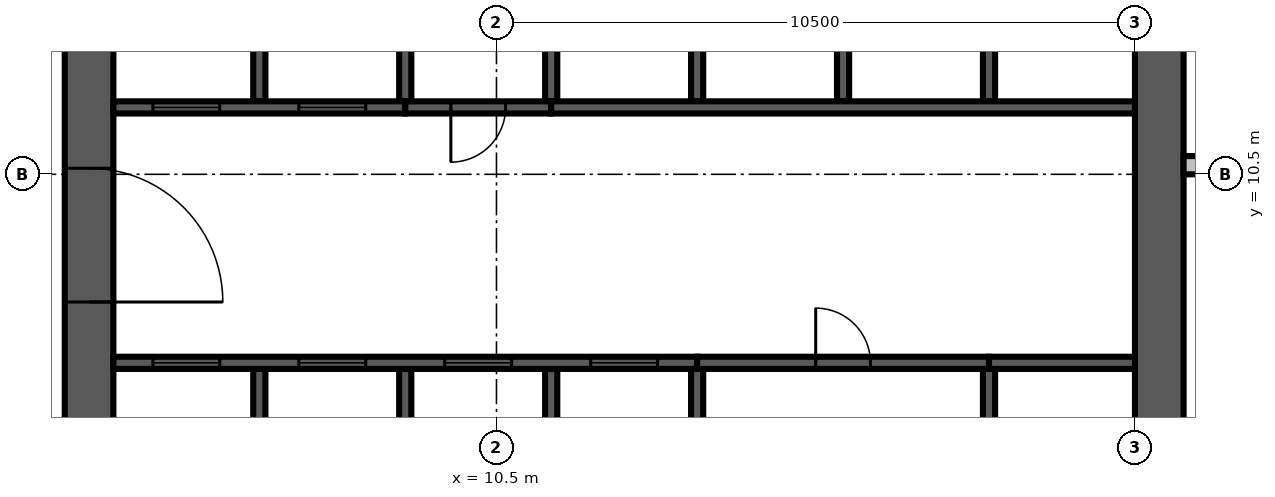
"""IFC4 building model, lengths in metres.
Left out: names, types, materials, properties, quantities, classifications, styles, units other than length and angle.
Written with IfcOpenShell. Run it as: python <this file> out.ifc"""

import sys

from ifc_helpers import new_model, si_unit, direction, frame, frame_2d, origin, place, context, subcontext, project, spatial, rectangle, extrude, source, transform, mapped, element, fill, save


model = new_model("IFC4")
c1 = context("Model", 3, precision=1e-05, world=origin(), true_north=direction((0.0, 1.0)))
c2 = subcontext(c1, "Body", "Model", "MODEL_VIEW")
j1 = project(units=[si_unit("LENGTHUNIT", "METRE"), si_unit("PLANEANGLEUNIT", "RADIAN")], contexts=[c1])
p1 = place(None, origin())
s1 = spatial("IfcSite", under=j1, at=p1, CompositionType="ELEMENT")
p2 = place(p1, origin())
s2 = spatial("IfcBuilding", under=s1, at=p2, CompositionType="ELEMENT")
p3 = place(p2, frame((0.0, 0.0, 257.6)))
s3 = spatial("IfcBuildingStorey", under=s2, at=p3, CompositionType="ELEMENT", Elevation=257.6)
m1 = source(origin(), c2, "Body", "SweptSolid", [
    extrude(rectangle(XDim=17.6, YDim=0.8, at=frame_2d((8.8, 0.0))), origin(), (0.0, 0.0, 1.0), 3.8),
])
p4 = place(p3, frame((3.8, 4.2, 0.0), z_axis=(0.0, 0.0, 1.0), x_axis=(0.0, 1.0, 0.0)))
e1 = element("IfcWall", 1, at=p4, inside=s3, PredefinedType="SHEAR", context=c2, shape_type="MappedRepresentation", body=[
    mapped(m1, transform((0.0, 0.0, 0.0), scale=1.0)),
])
m2 = source(origin(), c2, "Body", "SweptSolid", [
    extrude(rectangle(XDim=2.2, YDim=2.1, at=frame_2d((1.1, 1.05))), frame((0.0, 0.41, 0.0), z_axis=(0.0, -1.0, 0.0), x_axis=(1.0, 0.0, 0.0)), (0.0, 0.0, 1.0), 0.82),
])
p5 = place(p4, frame((4.2, 0.0, 0.0)))
e2 = element("IfcOpeningElement", 2, at=p5, cuts=e1, PredefinedType="OPENING", context=c2, shape_type="MappedRepresentation", body=[
    mapped(m2, transform((0.0, 0.0, 0.0), scale=1.0)),
])
m3 = source(origin(), c2, "Body", "SweptSolid", [
    extrude(rectangle(XDim=0.9, YDim=2.1, at=frame_2d((0.45, 1.05))), frame((0.0, 0.41, 0.0), z_axis=(0.0, -1.0, 0.0), x_axis=(1.0, 0.0, 0.0)), (0.0, 0.0, 1.0), 0.82),
])
p6 = place(p4, frame((10.95, 0.0, 0.0)))
e3 = element("IfcOpeningElement", 3, at=p6, cuts=e1, PredefinedType="OPENING", context=c2, shape_type="MappedRepresentation", body=[
    mapped(m3, transform((0.0, 0.0, 0.0), scale=1.0)),
])
m4 = source(origin(), c2, "Body", "SweptSolid", [
    extrude(rectangle(XDim=16.8, YDim=0.8, at=frame_2d((8.4, 0.0))), origin(), (0.0, 0.0, 1.0), 3.8),
])
p7 = place(p3, frame((21.4, 4.2, 0.0), z_axis=(0.0, 0.0, 1.0), x_axis=(0.0, 1.0, 0.0)))
e4 = element("IfcWall", 4, at=p7, inside=s3, PredefinedType="SHEAR", context=c2, shape_type="MappedRepresentation", body=[
    mapped(m4, transform((0.0, 0.0, 0.0), scale=1.0)),
])
m5 = source(origin(), c2, "Body", "SweptSolid", [
    extrude(rectangle(XDim=1.2, YDim=2.1, at=frame_2d((0.6, 1.05))), frame((0.0, 0.41, 0.0), z_axis=(0.0, -1.0, 0.0), x_axis=(1.0, 0.0, 0.0)), (0.0, 0.0, 1.0), 0.82),
])
p8 = place(p7, frame((14.7, 0.0, 0.0)))
e5 = element("IfcOpeningElement", 5, at=p8, cuts=e4, PredefinedType="OPENING", context=c2, shape_type="MappedRepresentation", body=[
    mapped(m5, transform((0.0, 0.0, 0.0), scale=1.0)),
])
m6 = source(origin(), c2, "Body", "SweptSolid", [
    extrude(rectangle(XDim=7.2, YDim=0.3, at=frame_2d((3.6, 0.0))), origin(), (0.0, 0.0, 1.0), 3.4),
])
p9 = place(p3, frame((21.8, 10.65, 0.0), z_axis=(0.0, 0.0, 1.0), x_axis=(1.0, 0.0, 0.0)))
e6 = element("IfcWall", 6, at=p9, inside=s3, PredefinedType="STANDARD", context=c2, shape_type="MappedRepresentation", body=[
    mapped(m6, transform((0.0, 0.0, 0.0), scale=1.0)),
])
m7 = source(origin(), c2, "Body", "SweptSolid", [
    extrude(rectangle(XDim=1.8, YDim=2.3, at=frame_2d((0.9, 1.15))), frame((0.0, 0.16, 0.0), z_axis=(0.0, -1.0, 0.0), x_axis=(1.0, 0.0, 0.0)), (0.0, 0.0, 1.0), 0.32),
])
p10 = place(p9, frame((0.4, 0.0, 0.6)))
e7 = element("IfcOpeningElement", 7, at=p10, cuts=e6, PredefinedType="OPENING", context=c2, shape_type="MappedRepresentation", body=[
    mapped(m7, transform((0.0, 0.0, 0.0), scale=1.0)),
])
p11 = place(p9, frame((4.787, 0.0, 0.6)))
e8 = element("IfcOpeningElement", 8, at=p11, cuts=e6, PredefinedType="OPENING", context=c2, shape_type="MappedRepresentation", body=[
    mapped(m7, transform((0.0, 0.0, 0.0), scale=1.0)),
])
m8 = source(origin(), c2, "Body", "SweptSolid", [
    extrude(rectangle(XDim=3.1, YDim=0.2, at=frame_2d((1.55, 0.0))), origin(), (0.0, 0.0, 1.0), 3.8),
])
for number, where, z_axis, x_axis in (
    (9, (6.6, 4.2, 0.0), (0.0, 0.0, 1.0), (0.0, 1.0, 0.0)),
    (10, (9.0, 4.2, 0.0), (0.0, 0.0, 1.0), (0.0, 1.0, 0.0)),
    (11, (11.4, 4.2, 0.0), (0.0, 0.0, 1.0), (0.0, 1.0, 0.0)),
):
    element("IfcWall", number, at=place(p3, frame(where, z_axis=z_axis, x_axis=x_axis)), inside=s3, PredefinedType="SOLIDWALL", context=c2, shape_type="MappedRepresentation", body=[
        mapped(m8, transform((0.0, 0.0, 0.0), scale=1.0)),
    ])
m9 = source(origin(), c2, "Body", "SweptSolid", [
    extrude(rectangle(XDim=3.1, YDim=0.2, at=frame_2d((1.55, 0.0))), origin(), (0.0, 0.0, 1.0), 3.4),
])
for number, where, z_axis, x_axis in (
    (12, (13.8, 4.2, 0.0), (0.0, 0.0, 1.0), (0.0, 1.0, 0.0)),
    (13, (18.6, 4.2, 0.0), (0.0, 0.0, 1.0), (0.0, 1.0, 0.0)),
):
    element("IfcWall", number, at=place(p3, frame(where, z_axis=z_axis, x_axis=x_axis)), inside=s3, PredefinedType="SOLIDWALL", context=c2, shape_type="MappedRepresentation", body=[
        mapped(m9, transform((0.0, 0.0, 0.0), scale=1.0)),
    ])
m10 = source(origin(), c2, "Body", "SweptSolid", [
    extrude(rectangle(XDim=3.0, YDim=0.2, at=frame_2d((1.5, 0.0))), origin(), (0.0, 0.0, 1.0), 3.8),
])
p12 = place(p3, frame((6.6, 11.7, 0.0), z_axis=(0.0, 0.0, 1.0), x_axis=(0.0, 1.0, 0.0)))
e14 = element("IfcWall", 14, at=p12, inside=s3, PredefinedType="SOLIDWALL", context=c2, shape_type="MappedRepresentation", body=[
    mapped(m10, transform((0.0, 0.0, 0.0), scale=1.0)),
])
m11 = source(origin(), c2, "Body", "SweptSolid", [
    extrude(rectangle(XDim=3.0, YDim=0.2, at=frame_2d((1.5, 0.0))), origin(), (0.0, 0.0, 1.0), 3.4),
])
for number, where, z_axis, x_axis in (
    (15, (9.0, 11.7, 0.0), (0.0, 0.0, 1.0), (0.0, 1.0, 0.0)),
    (16, (11.4, 11.7, 0.0), (0.0, 0.0, 1.0), (0.0, 1.0, 0.0)),
):
    element("IfcWall", number, at=place(p3, frame(where, z_axis=z_axis, x_axis=x_axis)), inside=s3, PredefinedType="SOLIDWALL", context=c2, shape_type="MappedRepresentation", body=[
        mapped(m11, transform((0.0, 0.0, 0.0), scale=1.0)),
    ])
for number, where, z_axis, x_axis in (
    (17, (13.8, 11.7, 0.0), (0.0, 0.0, 1.0), (0.0, 1.0, 0.0)),
    (18, (16.2, 11.7, 0.0), (0.0, 0.0, 1.0), (0.0, 1.0, 0.0)),
    (19, (18.6, 11.7, 0.0), (0.0, 0.0, 1.0), (0.0, 1.0, 0.0)),
):
    element("IfcWall", number, at=place(p3, frame(where, z_axis=z_axis, x_axis=x_axis)), inside=s3, PredefinedType="SOLIDWALL", context=c2, shape_type="MappedRepresentation", body=[
        mapped(m10, transform((0.0, 0.0, 0.0), scale=1.0)),
    ])
m12 = source(origin(), c2, "Body", "SweptSolid", [
    extrude(rectangle(XDim=9.6, YDim=0.2, at=frame_2d((4.8, 0.0))), origin(), (0.0, 0.0, 1.0), 3.8),
])
p13 = place(p3, frame((4.2, 7.4, 0.0), z_axis=(0.0, 0.0, 1.0), x_axis=(1.0, 0.0, 0.0)))
e20 = element("IfcWall", 20, at=p13, inside=s3, PredefinedType="SOLIDWALL", context=c2, shape_type="MappedRepresentation", body=[
    mapped(m12, transform((0.0, 0.0, 0.0), scale=1.0)),
])
m13 = source(origin(), c2, "Body", "SweptSolid", [
    extrude(rectangle(XDim=1.1, YDim=2.1, at=frame_2d((0.55, 1.05))), frame((0.0, 0.11, 0.0), z_axis=(0.0, -1.0, 0.0), x_axis=(1.0, 0.0, 0.0)), (0.0, 0.0, 1.0), 0.22),
])
p14 = place(p13, frame((0.65, 0.0, 0.0)))
e21 = element("IfcOpeningElement", 21, at=p14, cuts=e20, PredefinedType="OPENING", context=c2, shape_type="MappedRepresentation", body=[
    mapped(m13, transform((0.0, 0.0, 0.0), scale=1.0)),
])
p15 = place(p13, frame((3.05, 0.0, 0.0)))
e22 = element("IfcOpeningElement", 22, at=p15, cuts=e20, PredefinedType="OPENING", context=c2, shape_type="MappedRepresentation", body=[
    mapped(m13, transform((0.0, 0.0, 0.0), scale=1.0)),
])
p16 = place(p13, frame((5.45, 0.0, 0.0)))
e23 = element("IfcOpeningElement", 23, at=p16, cuts=e20, PredefinedType="OPENING", context=c2, shape_type="MappedRepresentation", body=[
    mapped(m13, transform((0.0, 0.0, 0.0), scale=1.0)),
])
p17 = place(p13, frame((7.85, 0.0, 0.0)))
e24 = element("IfcOpeningElement", 24, at=p17, cuts=e20, PredefinedType="OPENING", context=c2, shape_type="MappedRepresentation", body=[
    mapped(m13, transform((0.0, 0.0, 0.0), scale=1.0)),
])
m14 = source(origin(), c2, "Body", "SweptSolid", [
    extrude(rectangle(XDim=4.8, YDim=0.2, at=frame_2d((2.4, 0.0))), origin(), (0.0, 0.0, 1.0), 3.4),
])
p18 = place(p3, frame((13.8, 7.4, 0.0), z_axis=(0.0, 0.0, 1.0), x_axis=(1.0, 0.0, 0.0)))
e25 = element("IfcWall", 25, at=p18, inside=s3, PredefinedType="SOLIDWALL", context=c2, shape_type="MappedRepresentation", body=[
    mapped(m14, transform((0.0, 0.0, 0.0), scale=1.0)),
])
m15 = source(origin(), c2, "Body", "SweptSolid", [
    extrude(rectangle(XDim=0.9, YDim=2.1, at=frame_2d((0.45, 1.05))), frame((0.0, 0.11, 0.0), z_axis=(0.0, -1.0, 0.0), x_axis=(1.0, 0.0, 0.0)), (0.0, 0.0, 1.0), 0.22),
])
p19 = place(p18, frame((1.95, 0.0, 0.0)))
e26 = element("IfcOpeningElement", 26, at=p19, cuts=e25, PredefinedType="OPENING", context=c2, shape_type="MappedRepresentation", body=[
    mapped(m15, transform((0.0, 0.0, 0.0), scale=1.0)),
])
m16 = source(origin(), c2, "Body", "SweptSolid", [
    extrude(rectangle(XDim=2.4, YDim=0.2, at=frame_2d((1.2, 0.0))), origin(), (0.0, 0.0, 1.0), 3.8),
])
p20 = place(p3, frame((18.6, 7.4, 0.0), z_axis=(0.0, 0.0, 1.0), x_axis=(1.0, 0.0, 0.0)))
e27 = element("IfcWall", 27, at=p20, inside=s3, PredefinedType="SOLIDWALL", context=c2, shape_type="MappedRepresentation", body=[
    mapped(m16, transform((0.0, 0.0, 0.0), scale=1.0)),
])
m17 = source(origin(), c2, "Body", "SweptSolid", [
    extrude(rectangle(XDim=4.8, YDim=0.2, at=frame_2d((2.4, 0.0))), origin(), (0.0, 0.0, 1.0), 3.8),
])
p21 = place(p3, frame((4.2, 11.6, 0.0), z_axis=(0.0, 0.0, 1.0), x_axis=(1.0, 0.0, 0.0)))
e28 = element("IfcWall", 28, at=p21, inside=s3, PredefinedType="SOLIDWALL", context=c2, shape_type="MappedRepresentation", body=[
    mapped(m17, transform((0.0, 0.0, 0.0), scale=1.0)),
])
p22 = place(p21, frame((0.65, 0.0, 0.0)))
e29 = element("IfcOpeningElement", 29, at=p22, cuts=e28, PredefinedType="OPENING", context=c2, shape_type="MappedRepresentation", body=[
    mapped(m13, transform((0.0, 0.0, 0.0), scale=1.0)),
])
p23 = place(p21, frame((3.05, 0.0, 0.0)))
e30 = element("IfcOpeningElement", 30, at=p23, cuts=e28, PredefinedType="OPENING", context=c2, shape_type="MappedRepresentation", body=[
    mapped(m13, transform((0.0, 0.0, 0.0), scale=1.0)),
])
m18 = source(origin(), c2, "Body", "SweptSolid", [
    extrude(rectangle(XDim=2.4, YDim=0.2, at=frame_2d((1.2, 0.0))), origin(), (0.0, 0.0, 1.0), 3.4),
])
p24 = place(p3, frame((9.0, 11.6, 0.0), z_axis=(0.0, 0.0, 1.0), x_axis=(1.0, 0.0, 0.0)))
e31 = element("IfcWall", 31, at=p24, inside=s3, PredefinedType="SOLIDWALL", context=c2, shape_type="MappedRepresentation", body=[
    mapped(m18, transform((0.0, 0.0, 0.0), scale=1.0)),
])
p25 = place(p24, frame((0.75, 0.0, 0.0)))
e32 = element("IfcOpeningElement", 32, at=p25, cuts=e31, PredefinedType="OPENING", context=c2, shape_type="MappedRepresentation", body=[
    mapped(m15, transform((0.0, 0.0, 0.0), scale=1.0)),
])
p26 = place(p3, frame((11.4, 11.6, 0.0), z_axis=(0.0, 0.0, 1.0), x_axis=(1.0, 0.0, 0.0)))
e33 = element("IfcWall", 33, at=p26, inside=s3, PredefinedType="SOLIDWALL", context=c2, shape_type="MappedRepresentation", body=[
    mapped(m12, transform((0.0, 0.0, 0.0), scale=1.0)),
])
m19 = source(origin(), c2, "Body", "SweptSolid", [
    extrude(rectangle(XDim=1.1, YDim=2.1, at=frame_2d((0.55, 1.05))), frame((0.0, 0.025, 0.0), z_axis=(0.0, -1.0, 0.0), x_axis=(1.0, 0.0, 0.0)), (0.0, 0.0, 1.0), 0.05),
])
p27 = place(p14, origin())
e34 = element("IfcDoor", 34, at=p27, inside=s3, OperationType="SLIDING_TO_LEFT", PredefinedType="DOOR", context=c2, shape_type="MappedRepresentation", body=[
    mapped(m19, transform((0.0, 0.0, 0.0), scale=1.0)),
])
fill(e21, e34)
p28 = place(p15, origin())
e35 = element("IfcDoor", 35, at=p28, inside=s3, OperationType="SLIDING_TO_LEFT", PredefinedType="DOOR", context=c2, shape_type="MappedRepresentation", body=[
    mapped(m19, transform((0.0, 0.0, 0.0), scale=1.0)),
])
fill(e22, e35)
p29 = place(p16, origin())
e36 = element("IfcDoor", 36, at=p29, inside=s3, OperationType="SLIDING_TO_LEFT", PredefinedType="DOOR", context=c2, shape_type="MappedRepresentation", body=[
    mapped(m19, transform((0.0, 0.0, 0.0), scale=1.0)),
])
fill(e23, e36)
p30 = place(p17, origin())
e37 = element("IfcDoor", 37, at=p30, inside=s3, OperationType="SLIDING_TO_LEFT", PredefinedType="DOOR", context=c2, shape_type="MappedRepresentation", body=[
    mapped(m19, transform((0.0, 0.0, 0.0), scale=1.0)),
])
fill(e24, e37)
m20 = source(origin(), c2, "Body", "SweptSolid", [
    extrude(rectangle(XDim=0.9, YDim=2.1, at=frame_2d((0.45, 1.05))), frame((0.0, 0.025, 0.0), z_axis=(0.0, -1.0, 0.0), x_axis=(1.0, 0.0, 0.0)), (0.0, 0.0, 1.0), 0.05),
])
p31 = place(p19, origin())
e38 = element("IfcDoor", 38, at=p31, inside=s3, OperationType="SINGLE_SWING_LEFT", PredefinedType="DOOR", context=c2, shape_type="MappedRepresentation", body=[
    mapped(m20, transform((0.0, 0.0, 0.0), scale=1.0)),
])
fill(e26, e38)
p32 = place(p22, origin())
e39 = element("IfcDoor", 39, at=p32, inside=s3, OperationType="SLIDING_TO_LEFT", PredefinedType="DOOR", context=c2, shape_type="MappedRepresentation", body=[
    mapped(m19, transform((0.0, 0.0, 0.0), scale=1.0)),
])
fill(e29, e39)
p33 = place(p23, origin())
e40 = element("IfcDoor", 40, at=p33, inside=s3, OperationType="SLIDING_TO_LEFT", PredefinedType="DOOR", context=c2, shape_type="MappedRepresentation", body=[
    mapped(m19, transform((0.0, 0.0, 0.0), scale=1.0)),
])
fill(e30, e40)
p34 = place(p25, origin())
e41 = element("IfcDoor", 41, at=p34, inside=s3, OperationType="SINGLE_SWING_RIGHT", PredefinedType="DOOR", context=c2, shape_type="MappedRepresentation", body=[
    mapped(m20, transform((0.0, 0.0, 0.0), scale=1.0)),
])
fill(e32, e41)
m21 = source(origin(), c2, "Body", "SweptSolid", [
    extrude(rectangle(XDim=2.2, YDim=2.1, at=frame_2d((1.1, 1.05))), frame((0.0, 0.025, 0.0), z_axis=(0.0, -1.0, 0.0), x_axis=(1.0, 0.0, 0.0)), (0.0, 0.0, 1.0), 0.05),
])
p35 = place(p5, origin())
e42 = element("IfcDoor", 42, at=p35, inside=s3, OperationType="DOUBLE_DOOR_SINGLE_SWING", PredefinedType="DOOR", context=c2, shape_type="MappedRepresentation", body=[
    mapped(m21, transform((0.0, 0.0, 0.0), scale=1.0)),
])
fill(e2, e42)
save(model, sys.argv[1])
